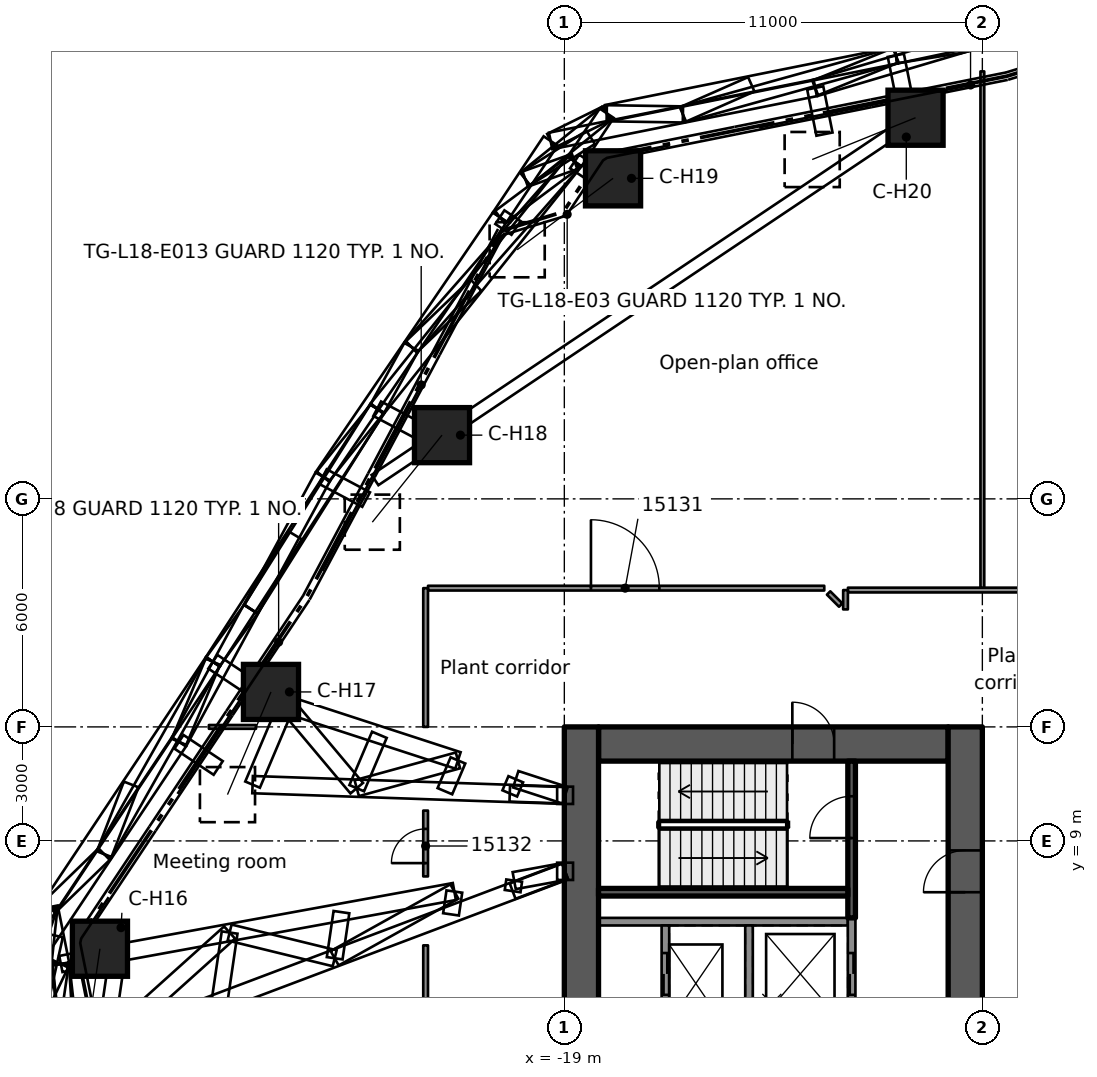
"""IFC4 building model, lengths in metres.
Left out: names, types, materials, properties, quantities, classifications, styles, units other than length and angle.
Written with IfcOpenShell. Run it as: python <this file> out.ifc"""

import sys

from ifc_helpers import new_model, si_unit, direction, frame, frame_2d, origin, origin_2d, place, context, subcontext, project, spatial, rectangle, extrude, element, fill, save


model = new_model("IFC4")
c1 = context("Model", 3, precision=1e-05, world=origin(), true_north=direction((0.0, 1.0)))
c2 = subcontext(c1, "Body", "Model", "MODEL_VIEW")
j1 = project(units=[si_unit("LENGTHUNIT", "METRE"), si_unit("PLANEANGLEUNIT", "RADIAN")], contexts=[c1])
p1 = place(None, origin())
s1 = spatial("IfcSite", under=j1, at=p1, CompositionType="ELEMENT")
p2 = place(p1, origin())
s2 = spatial("IfcBuilding", under=s1, at=p2, CompositionType="ELEMENT")
p3 = place(p2, frame((0.0, 0.0, 76.3)))
s3 = spatial("IfcBuildingStorey", under=s2, at=p3, CompositionType="ELEMENT", Elevation=76.3)
p4 = place(p3, frame((-18.1, 11.55, 0.0), z_axis=(0.0, 0.0, 1.0), x_axis=(1.0, 0.0, 0.0)))
e1 = element("IfcWall", 1, at=p4, inside=s3, PredefinedType="SHEAR", context=c2, shape_type="SweptSolid", body=[
    extrude(rectangle(XDim=9.2, YDim=0.9, at=frame_2d((4.6, 0.0))), origin(), (0.0, 0.0, 1.0), 4.4),
])
p5 = place(p4, frame((5.1, 0.0, 0.0)))
e2 = element("IfcOpeningElement", 2, at=p5, cuts=e1, PredefinedType="OPENING", context=c2, shape_type="SweptSolid", body=[
    extrude(rectangle(XDim=1.1, YDim=2.1, at=frame_2d((0.55, 1.05))), frame((0.0, 0.46, 0.0), z_axis=(0.0, -1.0, 0.0), x_axis=(1.0, 0.0, 0.0)), (0.0, 0.0, 1.0), 0.92),
])
p6 = place(p3, frame((-18.55, -12.0, 0.0), z_axis=(0.0, 0.0, 1.0), x_axis=(0.0, 1.0, 0.0)))
e3 = element("IfcWall", 3, at=p6, inside=s3, PredefinedType="SHEAR", context=c2, shape_type="SweptSolid", body=[
    extrude(rectangle(XDim=24.0, YDim=0.9, at=frame_2d((12.0, 0.0))), origin(), (0.0, 0.0, 1.0), 4.4),
])
p7 = place(p6, frame((5.9, 0.0, 0.0)))
e4 = element("IfcOpeningElement", 4, at=p7, cuts=e3, PredefinedType="OPENING", context=c2, shape_type="SweptSolid", body=[
    extrude(rectangle(XDim=1.8, YDim=2.1, at=frame_2d((0.9, 1.05))), frame((0.0, 0.46, 0.0), z_axis=(0.0, -1.0, 0.0), x_axis=(1.0, 0.0, 0.0)), (0.0, 0.0, 1.0), 0.92),
])
p8 = place(p6, frame((10.1, 0.0, 0.0)))
e5 = element("IfcOpeningElement", 5, at=p8, cuts=e3, PredefinedType="OPENING", context=c2, shape_type="SweptSolid", body=[
    extrude(rectangle(XDim=1.8, YDim=2.1, at=frame_2d((0.9, 1.05))), frame((0.0, 0.46, 0.0), z_axis=(0.0, -1.0, 0.0), x_axis=(1.0, 0.0, 0.0)), (0.0, 0.0, 1.0), 0.92),
])
p9 = place(p6, frame((14.3, 0.0, 0.0)))
e6 = element("IfcOpeningElement", 6, at=p9, cuts=e3, PredefinedType="OPENING", context=c2, shape_type="SweptSolid", body=[
    extrude(rectangle(XDim=1.8, YDim=2.1, at=frame_2d((0.9, 1.05))), frame((0.0, 0.46, 0.0), z_axis=(0.0, -1.0, 0.0), x_axis=(1.0, 0.0, 0.0)), (0.0, 0.0, 1.0), 0.92),
])
p10 = place(p3, frame((-8.45, -12.0, 0.0), z_axis=(0.0, 0.0, 1.0), x_axis=(0.0, 1.0, 0.0)))
e7 = element("IfcWall", 7, at=p10, inside=s3, PredefinedType="SHEAR", context=c2, shape_type="SweptSolid", body=[
    extrude(rectangle(XDim=24.0, YDim=0.9, at=frame_2d((12.0, 0.0))), origin(), (0.0, 0.0, 1.0), 4.4),
])
p11 = place(p10, frame((9.6, 0.0, 0.0)))
e8 = element("IfcOpeningElement", 8, at=p11, cuts=e7, PredefinedType="OPENING", context=c2, shape_type="SweptSolid", body=[
    extrude(rectangle(XDim=1.8, YDim=2.1, at=frame_2d((0.9, 1.05))), frame((0.0, 0.46, 0.0), z_axis=(0.0, -1.0, 0.0), x_axis=(1.0, 0.0, 0.0)), (0.0, 0.0, 1.0), 0.92),
])
p12 = place(p10, frame((5.9, 0.0, 0.0)))
e9 = element("IfcOpeningElement", 9, at=p12, cuts=e7, PredefinedType="OPENING", context=c2, shape_type="SweptSolid", body=[
    extrude(rectangle(XDim=1.8, YDim=2.1, at=frame_2d((0.9, 1.05))), frame((0.0, 0.46, 0.0), z_axis=(0.0, -1.0, 0.0), x_axis=(1.0, 0.0, 0.0)), (0.0, 0.0, 1.0), 0.92),
])
p13 = place(p10, frame((12.6, 0.0, 0.0)))
e10 = element("IfcOpeningElement", 10, at=p13, cuts=e7, PredefinedType="OPENING", context=c2, shape_type="SweptSolid", body=[
    extrude(rectangle(XDim=1.8, YDim=2.1, at=frame_2d((0.9, 1.05))), frame((0.0, 0.46, 0.0), z_axis=(0.0, -1.0, 0.0), x_axis=(1.0, 0.0, 0.0)), (0.0, 0.0, 1.0), 0.92),
])
p14 = place(p10, frame((19.65, 0.0, 0.0)))
e11 = element("IfcOpeningElement", 11, at=p14, cuts=e7, PredefinedType="OPENING", context=c2, shape_type="SweptSolid", body=[
    extrude(rectangle(XDim=1.1, YDim=2.1, at=frame_2d((0.55, 1.05))), frame((0.0, 0.46, 0.0), z_axis=(0.0, -1.0, 0.0), x_axis=(1.0, 0.0, 0.0)), (0.0, 0.0, 1.0), 0.92),
])
p15 = place(p10, frame((2.2, 0.0, 0.0)))
e12 = element("IfcOpeningElement", 12, at=p15, cuts=e7, PredefinedType="OPENING", context=c2, shape_type="SweptSolid", body=[
    extrude(rectangle(XDim=0.8, YDim=2.1, at=frame_2d((0.4, 1.05))), frame((0.0, 0.46, 0.0), z_axis=(0.0, -1.0, 0.0), x_axis=(1.0, 0.0, 0.0)), (0.0, 0.0, 1.0), 0.92),
])
p16 = place(p3, frame((-31.22, 6.163, 0.491), z_axis=(-0.098169402539, -0.670106023434, 0.735744986909), x_axis=(0.989438817347, -0.144951118407, 0.0)))
e13 = element("IfcColumn", 13, at=p16, inside=s3, PredefinedType="COLUMN", context=c2, shape_type="SweptSolid", body=[
    extrude(rectangle(XDim=1.45, YDim=1.45, at=origin_2d()), origin(), (0.0, 0.0, 1.0), 4.646),
])
p17 = place(p3, frame((-26.719, 12.92, 0.469), z_axis=(-0.252280476656, -0.595306617304, 0.762866038366), x_axis=(0.920733990351, -0.390190875101, 0.0)))
e14 = element("IfcColumn", 14, at=p17, inside=s3, PredefinedType="COLUMN", context=c2, shape_type="SweptSolid", body=[
    extrude(rectangle(XDim=1.45, YDim=1.45, at=origin_2d()), origin(), (0.0, 0.0, 1.0), 4.539),
])
p18 = place(p3, frame((-22.219, 19.677, 0.469), z_axis=(-0.404114198636, -0.504604790097, 0.762932316967), x_axis=(0.780543967772, -0.625100883358, 0.0)))
e15 = element("IfcColumn", 15, at=p18, inside=s3, PredefinedType="COLUMN", context=c2, shape_type="SweptSolid", body=[
    extrude(rectangle(XDim=1.45, YDim=1.45, at=origin_2d()), origin(), (0.0, 0.0, 1.0), 4.538),
])
p19 = place(p3, frame((-17.718, 26.434, 0.491), z_axis=(-0.5431164527, -0.404525579295, 0.735787723805), x_axis=(0.597339433781, -0.801988529127, 0.0)))
e16 = element("IfcColumn", 16, at=p19, inside=s3, PredefinedType="COLUMN", context=c2, shape_type="SweptSolid", body=[
    extrude(rectangle(XDim=1.45, YDim=1.45, at=origin_2d()), origin(), (0.0, 0.0, 1.0), 4.645),
])
p20 = place(p3, frame((-9.758, 28.029, 0.469), z_axis=(-0.599329365947, -0.242399975133, 0.762919761947), x_axis=(0.374945909979, -0.927046689542, 0.0)))
e17 = element("IfcColumn", 17, at=p20, inside=s3, PredefinedType="COLUMN", context=c2, shape_type="SweptSolid", body=[
    extrude(rectangle(XDim=1.45, YDim=1.45, at=origin_2d()), origin(), (0.0, 0.0, 1.0), 4.538),
])
p21 = place(p3, frame((-11.54, 6.875, 0.0), z_axis=(0.0, 0.0, 1.0), x_axis=(-1.0, 0.0, 0.0)))
e18 = element("IfcWall", 18, at=p21, inside=s3, PredefinedType="SOLIDWALL", context=c2, shape_type="SweptSolid", body=[
    extrude(rectangle(XDim=6.56, YDim=0.2, at=frame_2d((3.28, 0.0))), origin(), (0.0, 0.0, 1.0), 3.99),
])
p22 = place(p3, frame((-11.44, -6.975, 0.0), z_axis=(0.0, 0.0, 1.0), x_axis=(0.0, 1.0, 0.0)))
e19 = element("IfcWall", 19, at=p22, inside=s3, PredefinedType="SOLIDWALL", context=c2, shape_type="SweptSolid", body=[
    extrude(rectangle(XDim=13.95, YDim=0.2, at=frame_2d((6.975, 0.0))), origin(), (0.0, 0.0, 1.0), 3.99),
])
p23 = place(p22, frame((6.425, 0.0, 0.0)))
e20 = element("IfcOpeningElement", 20, at=p23, cuts=e19, PredefinedType="OPENING", context=c2, shape_type="SweptSolid", body=[
    extrude(rectangle(XDim=1.1, YDim=2.1, at=frame_2d((0.55, 1.05))), frame((0.0, 0.11, 0.0), z_axis=(0.0, -1.0, 0.0), x_axis=(1.0, 0.0, 0.0)), (0.0, 0.0, 1.0), 0.22),
])
p24 = place(p22, frame((9.175, 0.0, 0.0)))
e21 = element("IfcOpeningElement", 21, at=p24, cuts=e19, PredefinedType="OPENING", context=c2, shape_type="SweptSolid", body=[
    extrude(rectangle(XDim=1.1, YDim=2.1, at=frame_2d((0.55, 1.05))), frame((0.0, 0.11, 0.0), z_axis=(0.0, -1.0, 0.0), x_axis=(1.0, 0.0, 0.0)), (0.0, 0.0, 1.0), 0.22),
])
p25 = place(p22, frame((11.925, 0.0, 0.0)))
e22 = element("IfcOpeningElement", 22, at=p25, cuts=e19, PredefinedType="OPENING", context=c2, shape_type="SweptSolid", body=[
    extrude(rectangle(XDim=1.1, YDim=2.1, at=frame_2d((0.55, 1.05))), frame((0.0, 0.11, 0.0), z_axis=(0.0, -1.0, 0.0), x_axis=(1.0, 0.0, 0.0)), (0.0, 0.0, 1.0), 0.22),
])
p26 = place(p22, frame((1.075, 0.0, 0.0)))
e23 = element("IfcOpeningElement", 23, at=p26, cuts=e19, PredefinedType="OPENING", context=c2, shape_type="SweptSolid", body=[
    extrude(rectangle(XDim=0.8, YDim=2.1, at=frame_2d((0.4, 1.05))), frame((0.0, 0.11, 0.0), z_axis=(0.0, -1.0, 0.0), x_axis=(1.0, 0.0, 0.0)), (0.0, 0.0, 1.0), 0.22),
])
p27 = place(p3, frame((-14.14, 4.225, 0.0), z_axis=(0.0, 0.0, 1.0), x_axis=(0.0, 1.0, 0.0)))
e24 = element("IfcWall", 24, at=p27, inside=s3, PredefinedType="SOLIDWALL", context=c2, shape_type="SweptSolid", body=[
    extrude(rectangle(XDim=2.55, YDim=0.2, at=frame_2d((1.275, 0.0))), origin(), (0.0, 0.0, 1.0), 3.99),
])
p28 = place(p3, frame((-16.34, 4.025, 0.0), z_axis=(0.0, 0.0, 1.0), x_axis=(0.0, 1.0, 0.0)))
e25 = element("IfcWall", 25, at=p28, inside=s3, PredefinedType="SOLIDWALL", context=c2, shape_type="SweptSolid", body=[
    extrude(rectangle(XDim=2.75, YDim=0.2, at=frame_2d((1.375, 0.0))), origin(), (0.0, 0.0, 1.0), 3.99),
])
p29 = place(p28, frame((0.925, 0.0, 0.0)))
e26 = element("IfcOpeningElement", 26, at=p29, cuts=e25, PredefinedType="OPENING", context=c2, shape_type="SweptSolid", body=[
    extrude(rectangle(XDim=1.1, YDim=2.1, at=frame_2d((0.55, 1.05))), frame((0.0, 0.11, 0.0), z_axis=(0.0, -1.0, 0.0), x_axis=(1.0, 0.0, 0.0)), (0.0, 0.0, 1.0), 0.22),
])
p30 = place(p3, frame((-11.44, 6.975, 0.0), z_axis=(0.0, 0.0, 1.0), x_axis=(0.0, 1.0, 0.0)))
e27 = element("IfcWall", 27, at=p30, inside=s3, PredefinedType="SOLIDWALL", context=c2, shape_type="SweptSolid", body=[
    extrude(rectangle(XDim=4.125, YDim=0.2, at=frame_2d((2.062, 0.0))), origin(), (0.0, 0.0, 1.0), 3.99),
])
p31 = place(p30, frame((2.1, 0.0, 0.0)))
e28 = element("IfcOpeningElement", 28, at=p31, cuts=e27, PredefinedType="OPENING", context=c2, shape_type="SweptSolid", body=[
    extrude(rectangle(XDim=1.1, YDim=2.1, at=frame_2d((0.55, 1.05))), frame((0.0, 0.11, 0.0), z_axis=(0.0, -1.0, 0.0), x_axis=(1.0, 0.0, 0.0)), (0.0, 0.0, 1.0), 0.22),
])
p32 = place(p3, frame((-11.54, 7.65, 0.0), z_axis=(0.0, 0.0, 1.0), x_axis=(-1.0, 0.0, 0.0)))
e29 = element("IfcWall", 29, at=p32, inside=s3, PredefinedType="SOLIDWALL", context=c2, shape_type="SweptSolid", body=[
    extrude(rectangle(XDim=6.56, YDim=0.2, at=frame_2d((3.28, 0.0))), origin(), (0.0, 0.0, 1.0), 3.99),
])
p33 = place(p3, frame((-12.046, 15.524, 0.0), z_axis=(0.0, 0.0, 1.0), x_axis=(0.707106781187, -0.707106781187, 0.0)))
e30 = element("IfcWall", 30, at=p33, inside=s3, PredefinedType="PARTITIONING", context=c2, shape_type="SweptSolid", body=[
    extrude(rectangle(XDim=0.449, YDim=0.125, at=frame_2d((0.225, 0.0))), origin(), (0.0, 0.0, 1.0), 3.98),
])
p34 = place(p3, frame((-28.353, 12.0, 0.0), z_axis=(0.0, 0.0, 1.0), x_axis=(1.0, 0.0, 0.0)))
e31 = element("IfcWall", 31, at=p34, inside=s3, PredefinedType="PARTITIONING", context=c2, shape_type="SweptSolid", body=[
    extrude(rectangle(XDim=1.24, YDim=0.1, at=frame_2d((0.62, 0.0))), origin(), (0.0, 0.0, 1.0), 3.98),
])
p35 = place(p3, frame((-11.537, 15.601, 0.0), z_axis=(0.0, 0.0, 1.0), x_axis=(1.0, 0.0, 0.0)))
e32 = element("IfcWall", 32, at=p35, inside=s3, PredefinedType="PARTITIONING", context=c2, shape_type="SweptSolid", body=[
    extrude(rectangle(XDim=7.125, YDim=0.125, at=frame_2d((3.562, 0.0))), origin(), (0.0, 0.0, 1.0), 3.98),
])
p36 = place(p3, frame((-22.587, 15.651, 0.0), z_axis=(0.0, 0.0, 1.0), x_axis=(1.0, 0.0, 0.0)))
e33 = element("IfcWall", 33, at=p36, inside=s3, PredefinedType="PARTITIONING", context=c2, shape_type="SweptSolid", body=[
    extrude(rectangle(XDim=10.427, YDim=0.125, at=frame_2d((5.213, 0.0))), origin(), (0.0, 0.0, 1.0), 3.98),
])
p37 = place(p36, frame((4.288, 0.0, 0.0)))
e34 = element("IfcOpeningElement", 34, at=p37, cuts=e33, PredefinedType="OPENING", context=c2, shape_type="SweptSolid", body=[
    extrude(rectangle(XDim=1.8, YDim=2.1, at=frame_2d((0.9, 1.05))), frame((0.0, 0.073, 0.0), z_axis=(0.0, -1.0, 0.0), x_axis=(1.0, 0.0, 0.0)), (0.0, 0.0, 1.0), 0.145),
])
p38 = place(p3, frame((-11.601, 15.092, 0.0), z_axis=(0.0, 0.0, 1.0), x_axis=(0.00192214926, 0.999998152669, 0.0)))
e35 = element("IfcWall", 35, at=p38, inside=s3, PredefinedType="PARTITIONING", context=c2, shape_type="SweptSolid", body=[
    extrude(rectangle(XDim=0.508, YDim=0.125, at=frame_2d((0.254, 0.0))), origin(), (0.0, 0.0, 1.0), 3.98),
])
p39 = place(p3, frame((-8.0, 15.664, 0.0), z_axis=(0.0, 0.0, 1.0), x_axis=(0.0, 1.0, 0.0)))
e36 = element("IfcWall", 36, at=p39, inside=s3, PredefinedType="PARTITIONING", context=c2, shape_type="SweptSolid", body=[
    extrude(rectangle(XDim=13.584, YDim=0.1, at=frame_2d((6.792, 0.0))), origin(), (0.0, 0.0, 1.0), 3.98),
])
p40 = place(p3, frame((-22.65, -5.442, 0.0), z_axis=(0.0, 0.0, 1.0), x_axis=(0.0, 1.0, 0.0)))
e37 = element("IfcWall", 37, at=p40, inside=s3, PredefinedType="PARTITIONING", context=c2, shape_type="SweptSolid", body=[
    extrude(rectangle(XDim=11.694, YDim=0.125, at=frame_2d((5.847, 0.0))), origin(), (0.0, 0.0, 1.0), 3.98),
])
p41 = place(p40, frame((5.35, 0.0, 0.0)))
e38 = element("IfcOpeningElement", 38, at=p41, cuts=e37, PredefinedType="OPENING", context=c2, shape_type="SweptSolid", body=[
    extrude(rectangle(XDim=1.1, YDim=2.1, at=frame_2d((0.55, 1.05))), frame((0.0, 0.073, 0.0), z_axis=(0.0, -1.0, 0.0), x_axis=(1.0, 0.0, 0.0)), (0.0, 0.0, 1.0), 0.145),
])
p42 = place(p3, frame((-22.65, 8.066, 0.0), z_axis=(0.0, 0.0, 1.0), x_axis=(0.0, 1.0, 0.0)))
e39 = element("IfcWall", 39, at=p42, inside=s3, PredefinedType="PARTITIONING", context=c2, shape_type="SweptSolid", body=[
    extrude(rectangle(XDim=1.732, YDim=0.125, at=frame_2d((0.866, 0.0))), origin(), (0.0, 0.0, 1.0), 3.98),
])
p43 = place(p42, frame((0.35, 0.0, 0.0)))
e40 = element("IfcOpeningElement", 40, at=p43, cuts=e39, PredefinedType="OPENING", context=c2, shape_type="SweptSolid", body=[
    extrude(rectangle(XDim=0.9, YDim=2.1, at=frame_2d((0.45, 1.05))), frame((0.0, 0.073, 0.0), z_axis=(0.0, -1.0, 0.0), x_axis=(1.0, 0.0, 0.0)), (0.0, 0.0, 1.0), 0.145),
])
p44 = place(p3, frame((-22.65, 12.0, 0.0), z_axis=(0.0, 0.0, 1.0), x_axis=(0.0, 1.0, 0.0)))
e41 = element("IfcWall", 41, at=p44, inside=s3, PredefinedType="PARTITIONING", context=c2, shape_type="SweptSolid", body=[
    extrude(rectangle(XDim=3.651, YDim=0.125, at=frame_2d((1.825, 0.0))), origin(), (0.0, 0.0, 1.0), 3.98),
])
p45 = place(p25, origin())
e42 = element("IfcDoor", 42, at=p45, inside=s3, OperationType="DOUBLE_DOOR_SLIDING", PredefinedType="DOOR", context=c2, shape_type="SweptSolid", body=[
    extrude(rectangle(XDim=1.1, YDim=2.1, at=frame_2d((0.55, 1.05))), frame((0.0, 0.025, 0.0), z_axis=(0.0, -1.0, 0.0), x_axis=(1.0, 0.0, 0.0)), (0.0, 0.0, 1.0), 0.05),
])
fill(e22, e42)
p46 = place(p29, origin())
e43 = element("IfcDoor", 43, at=p46, inside=s3, OperationType="DOUBLE_DOOR_SLIDING", PredefinedType="DOOR", context=c2, shape_type="SweptSolid", body=[
    extrude(rectangle(XDim=1.1, YDim=2.1, at=frame_2d((0.55, 1.05))), frame((0.0, 0.025, 0.0), z_axis=(0.0, -1.0, 0.0), x_axis=(1.0, 0.0, 0.0)), (0.0, 0.0, 1.0), 0.05),
])
fill(e26, e43)
p47 = place(p14, origin())
e44 = element("IfcDoor", 44, at=p47, inside=s3, OperationType="SINGLE_SWING_RIGHT", PredefinedType="DOOR", context=c2, shape_type="SweptSolid", body=[
    extrude(rectangle(XDim=1.1, YDim=2.1, at=frame_2d((0.55, 1.05))), frame((0.0, 0.025, 0.0), z_axis=(0.0, -1.0, 0.0), x_axis=(1.0, 0.0, 0.0)), (0.0, 0.0, 1.0), 0.05),
])
fill(e11, e44)
p48 = place(p5, origin())
e45 = element("IfcDoor", 45, at=p48, inside=s3, OperationType="SINGLE_SWING_RIGHT", PredefinedType="DOOR", context=c2, shape_type="SweptSolid", body=[
    extrude(rectangle(XDim=1.1, YDim=2.1, at=frame_2d((0.55, 1.05))), frame((0.0, 0.025, 0.0), z_axis=(0.0, -1.0, 0.0), x_axis=(1.0, 0.0, 0.0)), (0.0, 0.0, 1.0), 0.05),
])
fill(e2, e45)
p49 = place(p31, origin())
e46 = element("IfcDoor", 46, at=p49, inside=s3, OperationType="SINGLE_SWING_RIGHT", PredefinedType="DOOR", context=c2, shape_type="SweptSolid", body=[
    extrude(rectangle(XDim=1.1, YDim=2.1, at=frame_2d((0.55, 1.05))), frame((0.0, 0.025, 0.0), z_axis=(0.0, -1.0, 0.0), x_axis=(1.0, 0.0, 0.0)), (0.0, 0.0, 1.0), 0.05),
])
fill(e28, e46)
p50 = place(p37, origin())
e47 = element("IfcDoor", 47, at=p50, inside=s3, OperationType="DOUBLE_DOOR_SINGLE_SWING", PredefinedType="DOOR", context=c2, shape_type="SweptSolid", body=[
    extrude(rectangle(XDim=1.8, YDim=2.1, at=frame_2d((0.9, 1.05))), frame((0.0, 0.025, 0.0), z_axis=(0.0, -1.0, 0.0), x_axis=(1.0, 0.0, 0.0)), (0.0, 0.0, 1.0), 0.05),
])
fill(e34, e47)
p51 = place(p43, origin())
e48 = element("IfcDoor", 48, at=p51, inside=s3, OperationType="SINGLE_SWING_LEFT", PredefinedType="DOOR", context=c2, shape_type="SweptSolid", body=[
    extrude(rectangle(XDim=0.9, YDim=2.1, at=frame_2d((0.45, 1.05))), frame((0.0, 0.025, 0.0), z_axis=(0.0, -1.0, 0.0), x_axis=(1.0, 0.0, 0.0)), (0.0, 0.0, 1.0), 0.05),
])
fill(e40, e48)
save(model, sys.argv[1])
